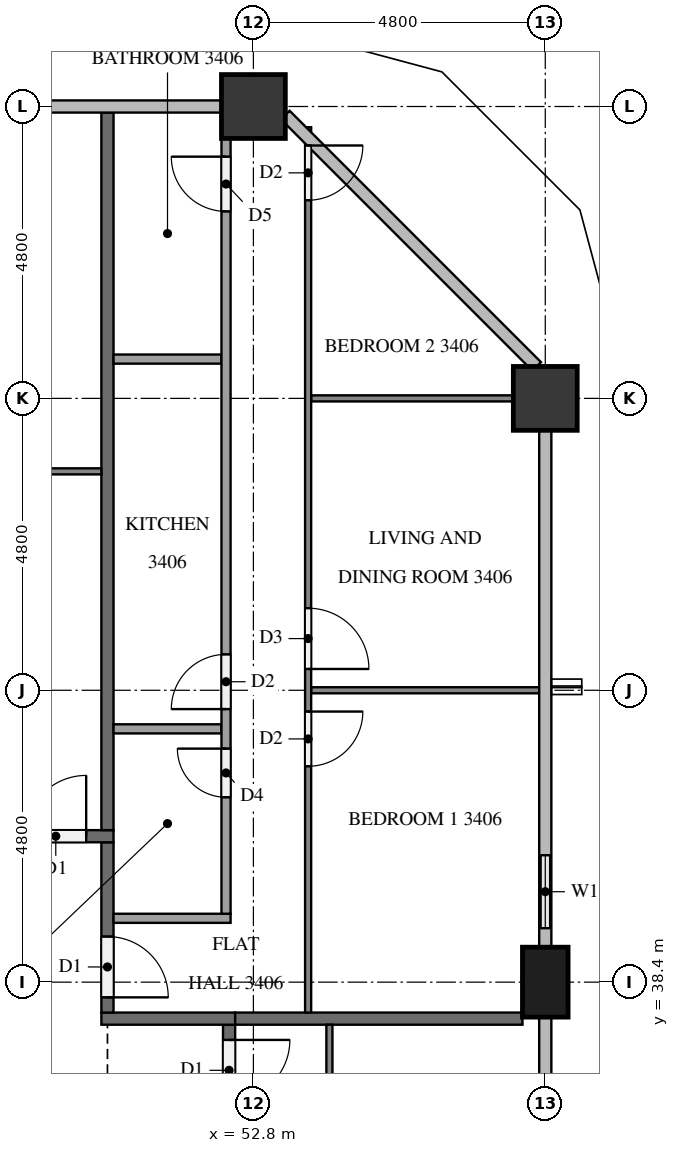
"""IFC4 building model, lengths in metres.
Left out: names, types, materials, properties, quantities, classifications, styles, units other than length and angle.
Written with IfcOpenShell. Run it as: python <this file> out.ifc"""

import sys

from ifc_helpers import new_model, si_unit, direction, frame, frame_2d, origin, origin_2d, place, context, subcontext, project, spatial, rectangle, extrude, element, fill, save


model = new_model("IFC4")
c1 = context("Model", 3, precision=1e-05, world=origin(), true_north=direction((0.0, 1.0)))
c2 = subcontext(c1, "Body", "Model", "MODEL_VIEW")
j1 = project(units=[si_unit("LENGTHUNIT", "METRE"), si_unit("PLANEANGLEUNIT", "RADIAN")], contexts=[c1])
p1 = place(None, origin())
s1 = spatial("IfcSite", under=j1, at=p1, CompositionType="ELEMENT")
p2 = place(p1, origin())
s2 = spatial("IfcBuilding", under=s1, at=p2, CompositionType="ELEMENT")
p3 = place(p2, frame((0.0, 0.0, 133.1)))
s3 = spatial("IfcBuildingStorey", under=s2, at=p3, CompositionType="ELEMENT", Elevation=133.1)
p4 = place(p3, frame((57.6, 38.4, 0.0), z_axis=(0.0, 0.0, 1.0), x_axis=(0.0, 1.0, 0.0)))
e1 = element("IfcColumn", 1, at=p4, inside=s3, PredefinedType="COLUMN", context=c2, shape_type="SweptSolid", body=[
    extrude(rectangle(XDim=1.15, YDim=0.75, at=origin_2d()), origin(), (0.0, 0.0, 1.0), 3.2),
])
for number, where, z_axis, x_axis in (
    (2, (57.6, 48.0, 0.0), (0.0, 0.0, 1.0), (1.0, 0.0, 0.0)),
    (3, (52.8, 52.8, 0.0), (0.0, 0.0, 1.0), (1.0, 0.0, 0.0)),
):
    element("IfcColumn", number, at=place(p3, frame(where, z_axis=z_axis, x_axis=x_axis)), inside=s3, PredefinedType="COLUMN", context=c2, shape_type="SweptSolid", body=[
        extrude(rectangle(XDim=1.05, YDim=1.05, at=origin_2d()), origin(), (0.0, 0.0, 1.0), 3.2),
    ])
p5 = place(p3, frame((57.6, 38.975, 0.0), z_axis=(0.0, 0.0, 1.0), x_axis=(0.0, 1.0, 0.0)))
e4 = element("IfcWall", 4, at=p5, inside=s3, PredefinedType="SOLIDWALL", context=c2, shape_type="SweptSolid", body=[
    extrude(rectangle(XDim=1.825, YDim=0.15, at=frame_2d((0.913, 0.0))), origin(), (0.0, 0.0, 1.0), 3.2),
])
p6 = place(p5, frame((0.312, 0.0, 0.9)))
e5 = element("IfcOpeningElement", 5, at=p6, cuts=e4, PredefinedType="OPENING", context=c2, shape_type="SweptSolid", body=[
    extrude(rectangle(XDim=1.2, YDim=1.4, at=frame_2d((0.6, 0.7))), frame((0.0, 0.085, 0.0), z_axis=(0.0, -1.0, 0.0), x_axis=(1.0, 0.0, 0.0)), (0.0, 0.0, 1.0), 0.17),
])
p7 = place(p3, frame((52.4, 37.7, 0.0), z_axis=(0.0, 0.0, 1.0), x_axis=(0.0, -1.0, 0.0)))
e6 = element("IfcWall", 6, at=p7, inside=s3, PredefinedType="PARTITIONING", context=c2, shape_type="SweptSolid", body=[
    extrude(rectangle(XDim=22.6, YDim=0.2, at=frame_2d((11.3, 0.0))), origin(), (0.0, 0.0, 1.0), 3.2),
])
p8 = place(p7, frame((0.25, 0.0, 0.0)))
e7 = element("IfcOpeningElement", 7, at=p8, cuts=e6, PredefinedType="OPENING", context=c2, shape_type="SweptSolid", body=[
    extrude(rectangle(XDim=1.0, YDim=2.1, at=frame_2d((0.5, 1.05))), frame((0.0, 0.11, 0.0), z_axis=(0.0, -1.0, 0.0), x_axis=(1.0, 0.0, 0.0)), (0.0, 0.0, 1.0), 0.22),
])
p9 = place(p3, frame((52.5, 37.8, 0.0), z_axis=(0.0, 0.0, 1.0), x_axis=(-1.0, 0.0, 0.0)))
e8 = element("IfcWall", 8, at=p9, inside=s3, PredefinedType="PARTITIONING", context=c2, shape_type="SweptSolid", body=[
    extrude(rectangle(XDim=2.2, YDim=0.2, at=frame_2d((1.1, 0.0))), origin(), (0.0, 0.0, 1.0), 3.2),
])
p10 = place(p3, frame((50.4, 40.7, 0.0), z_axis=(0.0, 0.0, 1.0), x_axis=(0.0, -1.0, 0.0)))
e9 = element("IfcWall", 9, at=p10, inside=s3, PredefinedType="PARTITIONING", context=c2, shape_type="SweptSolid", body=[
    extrude(rectangle(XDim=2.8, YDim=0.2, at=frame_2d((1.4, 0.0))), origin(), (0.0, 0.0, 1.0), 3.2),
])
p11 = place(p10, frame((1.55, 0.0, 0.0)))
e10 = element("IfcOpeningElement", 10, at=p11, cuts=e9, PredefinedType="OPENING", context=c2, shape_type="SweptSolid", body=[
    extrude(rectangle(XDim=1.0, YDim=2.1, at=frame_2d((0.5, 1.05))), frame((0.0, 0.11, 0.0), z_axis=(0.0, -1.0, 0.0), x_axis=(1.0, 0.0, 0.0)), (0.0, 0.0, 1.0), 0.22),
])
p12 = place(p3, frame((11.9, 40.8, 0.0), z_axis=(0.0, 0.0, 1.0), x_axis=(1.0, 0.0, 0.0)))
e11 = element("IfcWall", 11, at=p12, inside=s3, PredefinedType="PARTITIONING", context=c2, shape_type="SweptSolid", body=[
    extrude(rectangle(XDim=38.6, YDim=0.2, at=frame_2d((19.3, 0.0))), origin(), (0.0, 0.0, 1.0), 3.2),
])
p13 = place(p12, frame((37.15, 0.0, 0.0)))
e12 = element("IfcOpeningElement", 12, at=p13, cuts=e11, PredefinedType="OPENING", context=c2, shape_type="SweptSolid", body=[
    extrude(rectangle(XDim=1.0, YDim=2.1, at=frame_2d((0.5, 1.05))), frame((0.0, 0.11, 0.0), z_axis=(0.0, -1.0, 0.0), x_axis=(1.0, 0.0, 0.0)), (0.0, 0.0, 1.0), 0.22),
])
p14 = place(p12, frame((10.05, 0.0, 0.0)))
e13 = element("IfcOpeningElement", 13, at=p14, cuts=e11, PredefinedType="OPENING", context=c2, shape_type="SweptSolid", body=[
    extrude(rectangle(XDim=1.0, YDim=2.1, at=frame_2d((0.5, 1.05))), frame((0.0, 0.11, 0.0), z_axis=(0.0, -1.0, 0.0), x_axis=(1.0, 0.0, 0.0)), (0.0, 0.0, 1.0), 0.22),
])
p15 = place(p12, frame((0.45, 0.0, 0.0)))
e14 = element("IfcOpeningElement", 14, at=p15, cuts=e11, PredefinedType="OPENING", context=c2, shape_type="SweptSolid", body=[
    extrude(rectangle(XDim=1.0, YDim=2.1, at=frame_2d((0.5, 1.05))), frame((0.0, 0.11, 0.0), z_axis=(0.0, -1.0, 0.0), x_axis=(1.0, 0.0, 0.0)), (0.0, 0.0, 1.0), 0.22),
])
p16 = place(p3, frame((52.5, 37.8, 0.0), z_axis=(0.0, 0.0, 1.0), x_axis=(1.0, 0.0, 0.0)))
e15 = element("IfcWall", 15, at=p16, inside=s3, PredefinedType="PARTITIONING", context=c2, shape_type="SweptSolid", body=[
    extrude(rectangle(XDim=4.725, YDim=0.2, at=frame_2d((2.363, 0.0))), origin(), (0.0, 0.0, 1.0), 3.2),
])
p17 = place(p3, frame((50.4, 40.9, 0.0), z_axis=(0.0, 0.0, 1.0), x_axis=(0.0, 1.0, 0.0)))
e16 = element("IfcWall", 16, at=p17, inside=s3, PredefinedType="PARTITIONING", context=c2, shape_type="SweptSolid", body=[
    extrude(rectangle(XDim=11.8, YDim=0.2, at=frame_2d((5.9, 0.0))), origin(), (0.0, 0.0, 1.0), 3.2),
])
p18 = place(p3, frame((54.05, 37.7, 0.0), z_axis=(0.0, 0.0, 1.0), x_axis=(0.0, -1.0, 0.0)))
e17 = element("IfcWall", 17, at=p18, inside=s3, PredefinedType="PARTITIONING", context=c2, shape_type="SweptSolid", body=[
    extrude(rectangle(XDim=22.6, YDim=0.1, at=frame_2d((11.3, 0.0))), origin(), (0.0, 0.0, 1.0), 3.2),
])
p19 = place(p18, frame((2.85, 0.0, 0.0)))
e18 = element("IfcOpeningElement", 18, at=p19, cuts=e17, PredefinedType="OPENING", context=c2, shape_type="SweptSolid", body=[
    extrude(rectangle(XDim=0.9, YDim=2.1, at=frame_2d((0.45, 1.05))), frame((0.0, 0.06, 0.0), z_axis=(0.0, -1.0, 0.0), x_axis=(1.0, 0.0, 0.0)), (0.0, 0.0, 1.0), 0.12),
])
p20 = place(p18, frame((4.45, 0.0, 0.0)))
e19 = element("IfcOpeningElement", 19, at=p20, cuts=e17, PredefinedType="OPENING", context=c2, shape_type="SweptSolid", body=[
    extrude(rectangle(XDim=0.8, YDim=2.1, at=frame_2d((0.4, 1.05))), frame((0.0, 0.06, 0.0), z_axis=(0.0, -1.0, 0.0), x_axis=(1.0, 0.0, 0.0)), (0.0, 0.0, 1.0), 0.12),
])
p21 = place(p18, frame((10.05, 0.0, 0.0)))
e20 = element("IfcOpeningElement", 20, at=p21, cuts=e17, PredefinedType="OPENING", context=c2, shape_type="SweptSolid", body=[
    extrude(rectangle(XDim=0.9, YDim=2.1, at=frame_2d((0.45, 1.05))), frame((0.0, 0.06, 0.0), z_axis=(0.0, -1.0, 0.0), x_axis=(1.0, 0.0, 0.0)), (0.0, 0.0, 1.0), 0.12),
])
p22 = place(p18, frame((11.65, 0.0, 0.0)))
e21 = element("IfcOpeningElement", 21, at=p22, cuts=e17, PredefinedType="OPENING", context=c2, shape_type="SweptSolid", body=[
    extrude(rectangle(XDim=0.9, YDim=2.1, at=frame_2d((0.45, 1.05))), frame((0.0, 0.06, 0.0), z_axis=(0.0, -1.0, 0.0), x_axis=(1.0, 0.0, 0.0)), (0.0, 0.0, 1.0), 0.12),
])
p23 = place(p18, frame((19.55, 0.0, 0.0)))
e22 = element("IfcOpeningElement", 22, at=p23, cuts=e17, PredefinedType="OPENING", context=c2, shape_type="SweptSolid", body=[
    extrude(rectangle(XDim=1.0, YDim=2.1, at=frame_2d((0.5, 1.05))), frame((0.0, 0.06, 0.0), z_axis=(0.0, -1.0, 0.0), x_axis=(1.0, 0.0, 0.0)), (0.0, 0.0, 1.0), 0.12),
])
p24 = place(p18, frame((21.25, 0.0, 0.0)))
e23 = element("IfcOpeningElement", 23, at=p24, cuts=e17, PredefinedType="OPENING", context=c2, shape_type="SweptSolid", body=[
    extrude(rectangle(XDim=0.9, YDim=2.1, at=frame_2d((0.45, 1.05))), frame((0.0, 0.06, 0.0), z_axis=(0.0, -1.0, 0.0), x_axis=(1.0, 0.0, 0.0)), (0.0, 0.0, 1.0), 0.12),
])
p25 = place(p3, frame((53.75, 43.2, 0.0), z_axis=(0.0, 0.0, 1.0), x_axis=(1.0, 0.0, 0.0)))
e24 = element("IfcWall", 24, at=p25, inside=s3, PredefinedType="PARTITIONING", context=c2, shape_type="SweptSolid", body=[
    extrude(rectangle(XDim=3.75, YDim=0.1, at=frame_2d((1.875, 0.0))), origin(), (0.0, 0.0, 1.0), 3.2),
])
p26 = place(p3, frame((53.75, 48.0, 0.0), z_axis=(0.0, 0.0, 1.0), x_axis=(1.0, 0.0, 0.0)))
e25 = element("IfcWall", 25, at=p26, inside=s3, PredefinedType="PARTITIONING", context=c2, shape_type="SweptSolid", body=[
    extrude(rectangle(XDim=3.325, YDim=0.1, at=frame_2d((1.663, 0.0))), origin(), (0.0, 0.0, 1.0), 3.2),
])
p27 = place(p3, frame((53.7, 52.459, 0.0), z_axis=(0.0, 0.0, 1.0), x_axis=(0.0, -1.0, 0.0)))
e26 = element("IfcWall", 26, at=p27, inside=s3, PredefinedType="PARTITIONING", context=c2, shape_type="SweptSolid", body=[
    extrude(rectangle(XDim=14.559, YDim=0.1, at=frame_2d((7.279, 0.0))), origin(), (0.0, 0.0, 1.0), 3.2),
])
p28 = place(p27, frame((9.609, 0.0, 0.0)))
e27 = element("IfcOpeningElement", 27, at=p28, cuts=e26, PredefinedType="OPENING", context=c2, shape_type="SweptSolid", body=[
    extrude(rectangle(XDim=0.9, YDim=2.1, at=frame_2d((0.45, 1.05))), frame((0.0, 0.06, 0.0), z_axis=(0.0, -1.0, 0.0), x_axis=(1.0, 0.0, 0.0)), (0.0, 0.0, 1.0), 0.12),
])
p29 = place(p27, frame((7.909, 0.0, 0.0)))
e28 = element("IfcOpeningElement", 28, at=p29, cuts=e26, PredefinedType="OPENING", context=c2, shape_type="SweptSolid", body=[
    extrude(rectangle(XDim=1.0, YDim=2.1, at=frame_2d((0.5, 1.05))), frame((0.0, 0.06, 0.0), z_axis=(0.0, -1.0, 0.0), x_axis=(1.0, 0.0, 0.0)), (0.0, 0.0, 1.0), 0.12),
])
p30 = place(p27, frame((0.3, 0.0, 0.0)))
e29 = element("IfcOpeningElement", 29, at=p30, cuts=e26, PredefinedType="OPENING", context=c2, shape_type="SweptSolid", body=[
    extrude(rectangle(XDim=0.9, YDim=2.1, at=frame_2d((0.45, 1.05))), frame((0.0, 0.06, 0.0), z_axis=(0.0, -1.0, 0.0), x_axis=(1.0, 0.0, 0.0)), (0.0, 0.0, 1.0), 0.12),
])
for number, where, z_axis, x_axis in (
    (30, (50.5, 42.565, 0.0), (0.0, 0.0, 1.0), (1.0, 0.0, 0.0)),
    (31, (50.5, 48.646, 0.0), (0.0, 0.0, 1.0), (1.0, 0.0, 0.0)),
):
    element("IfcWall", number, at=place(p3, frame(where, z_axis=z_axis, x_axis=x_axis)), inside=s3, PredefinedType="PARTITIONING", context=c2, shape_type="SweptSolid", body=[
        extrude(rectangle(XDim=1.775, YDim=0.15, at=frame_2d((0.887, 0.0))), origin(), (0.0, 0.0, 1.0), 3.2),
    ])
p31 = place(p3, frame((50.5, 39.45, 0.0), z_axis=(0.0, 0.0, 1.0), x_axis=(1.0, 0.0, 0.0)))
e32 = element("IfcWall", 32, at=p31, inside=s3, PredefinedType="PARTITIONING", context=c2, shape_type="SweptSolid", body=[
    extrude(rectangle(XDim=1.925, YDim=0.15, at=frame_2d((0.962, 0.0))), origin(), (0.0, 0.0, 1.0), 3.2),
])
p32 = place(p3, frame((52.35, 39.525, 0.0), z_axis=(0.0, 0.0, 1.0), x_axis=(0.0, 1.0, 0.0)))
e33 = element("IfcWall", 33, at=p32, inside=s3, PredefinedType="PARTITIONING", context=c2, shape_type="SweptSolid", body=[
    extrude(rectangle(XDim=12.75, YDim=0.15, at=frame_2d((6.375, 0.0))), origin(), (0.0, 0.0, 1.0), 3.2),
])
p33 = place(p32, frame((1.915, 0.0, 0.0)))
e34 = element("IfcOpeningElement", 34, at=p33, cuts=e33, PredefinedType="OPENING", context=c2, shape_type="SweptSolid", body=[
    extrude(rectangle(XDim=0.8, YDim=2.1, at=frame_2d((0.4, 1.05))), frame((0.0, 0.085, 0.0), z_axis=(0.0, -1.0, 0.0), x_axis=(1.0, 0.0, 0.0)), (0.0, 0.0, 1.0), 0.17),
])
p34 = place(p32, frame((3.365, 0.0, 0.0)))
e35 = element("IfcOpeningElement", 35, at=p34, cuts=e33, PredefinedType="OPENING", context=c2, shape_type="SweptSolid", body=[
    extrude(rectangle(XDim=0.9, YDim=2.1, at=frame_2d((0.45, 1.05))), frame((0.0, 0.085, 0.0), z_axis=(0.0, -1.0, 0.0), x_axis=(1.0, 0.0, 0.0)), (0.0, 0.0, 1.0), 0.17),
])
p35 = place(p32, frame((11.55, 0.0, 0.0)))
e36 = element("IfcOpeningElement", 36, at=p35, cuts=e33, PredefinedType="OPENING", context=c2, shape_type="SweptSolid", body=[
    extrude(rectangle(XDim=0.9, YDim=2.1, at=frame_2d((0.45, 1.05))), frame((0.0, 0.085, 0.0), z_axis=(0.0, -1.0, 0.0), x_axis=(1.0, 0.0, 0.0)), (0.0, 0.0, 1.0), 0.17),
])
p36 = place(p3, frame((36.1, 46.8, 0.0), z_axis=(0.0, 0.0, 1.0), x_axis=(1.0, 0.0, 0.0)))
e37 = element("IfcWall", 37, at=p36, inside=s3, PredefinedType="PARTITIONING", context=c2, shape_type="SweptSolid", body=[
    extrude(rectangle(XDim=14.2, YDim=0.1, at=frame_2d((7.1, 0.0))), origin(), (0.0, 0.0, 1.0), 3.2),
])
p37 = place(p36, frame((9.85, 0.0, 0.0)))
e38 = element("IfcOpeningElement", 38, at=p37, cuts=e37, PredefinedType="OPENING", context=c2, shape_type="SweptSolid", body=[
    extrude(rectangle(XDim=0.9, YDim=2.1, at=frame_2d((0.45, 1.05))), frame((0.0, 0.06, 0.0), z_axis=(0.0, -1.0, 0.0), x_axis=(1.0, 0.0, 0.0)), (0.0, 0.0, 1.0), 0.12),
])
p38 = place(p36, frame((8.15, 0.0, 0.0)))
e39 = element("IfcOpeningElement", 39, at=p38, cuts=e37, PredefinedType="OPENING", context=c2, shape_type="SweptSolid", body=[
    extrude(rectangle(XDim=1.0, YDim=2.1, at=frame_2d((0.5, 1.05))), frame((0.0, 0.06, 0.0), z_axis=(0.0, -1.0, 0.0), x_axis=(1.0, 0.0, 0.0)), (0.0, 0.0, 1.0), 0.12),
])
p39 = place(p36, frame((0.3, 0.0, 0.0)))
e40 = element("IfcOpeningElement", 40, at=p39, cuts=e37, PredefinedType="OPENING", context=c2, shape_type="SweptSolid", body=[
    extrude(rectangle(XDim=0.9, YDim=2.1, at=frame_2d((0.45, 1.05))), frame((0.0, 0.06, 0.0), z_axis=(0.0, -1.0, 0.0), x_axis=(1.0, 0.0, 0.0)), (0.0, 0.0, 1.0), 0.12),
])
p40 = place(p6, origin())
e41 = element("IfcWindow", 41, at=p40, inside=s3, PartitioningType="SINGLE_PANEL", PredefinedType="WINDOW", context=c2, shape_type="SweptSolid", body=[
    extrude(rectangle(XDim=1.2, YDim=1.4, at=frame_2d((0.6, 0.7))), frame((0.0, 0.03, 0.0), z_axis=(0.0, -1.0, 0.0), x_axis=(1.0, 0.0, 0.0)), (0.0, 0.0, 1.0), 0.06),
])
fill(e5, e41)
p41 = place(p8, origin())
e42 = element("IfcDoor", 42, at=p41, inside=s3, OperationType="SINGLE_SWING_LEFT", PredefinedType="DOOR", context=c2, shape_type="SweptSolid", body=[
    extrude(rectangle(XDim=1.0, YDim=2.1, at=frame_2d((0.5, 1.05))), frame((0.0, 0.025, 0.0), z_axis=(0.0, -1.0, 0.0), x_axis=(1.0, 0.0, 0.0)), (0.0, 0.0, 1.0), 0.05),
])
fill(e7, e42)
p42 = place(p11, origin())
e43 = element("IfcDoor", 43, at=p42, inside=s3, OperationType="SINGLE_SWING_RIGHT", PredefinedType="DOOR", context=c2, shape_type="SweptSolid", body=[
    extrude(rectangle(XDim=1.0, YDim=2.1, at=frame_2d((0.5, 1.05))), frame((0.0, 0.025, 0.0), z_axis=(0.0, -1.0, 0.0), x_axis=(1.0, 0.0, 0.0)), (0.0, 0.0, 1.0), 0.05),
])
fill(e10, e43)
p43 = place(p13, origin())
e44 = element("IfcDoor", 44, at=p43, inside=s3, OperationType="SINGLE_SWING_RIGHT", PredefinedType="DOOR", context=c2, shape_type="SweptSolid", body=[
    extrude(rectangle(XDim=1.0, YDim=2.1, at=frame_2d((0.5, 1.05))), frame((0.0, 0.025, 0.0), z_axis=(0.0, -1.0, 0.0), x_axis=(1.0, 0.0, 0.0)), (0.0, 0.0, 1.0), 0.05),
])
fill(e12, e44)
p44 = place(p28, origin())
e45 = element("IfcDoor", 45, at=p44, inside=s3, OperationType="SINGLE_SWING_LEFT", PredefinedType="DOOR", context=c2, shape_type="SweptSolid", body=[
    extrude(rectangle(XDim=0.9, YDim=2.1, at=frame_2d((0.45, 1.05))), frame((0.0, 0.025, 0.0), z_axis=(0.0, -1.0, 0.0), x_axis=(1.0, 0.0, 0.0)), (0.0, 0.0, 1.0), 0.05),
])
fill(e27, e45)
p45 = place(p29, origin())
e46 = element("IfcDoor", 46, at=p45, inside=s3, OperationType="SINGLE_SWING_RIGHT", PredefinedType="DOOR", context=c2, shape_type="SweptSolid", body=[
    extrude(rectangle(XDim=1.0, YDim=2.1, at=frame_2d((0.5, 1.05))), frame((0.0, 0.025, 0.0), z_axis=(0.0, -1.0, 0.0), x_axis=(1.0, 0.0, 0.0)), (0.0, 0.0, 1.0), 0.05),
])
fill(e28, e46)
p46 = place(p30, origin())
e47 = element("IfcDoor", 47, at=p46, inside=s3, OperationType="SINGLE_SWING_LEFT", PredefinedType="DOOR", context=c2, shape_type="SweptSolid", body=[
    extrude(rectangle(XDim=0.9, YDim=2.1, at=frame_2d((0.45, 1.05))), frame((0.0, 0.025, 0.0), z_axis=(0.0, -1.0, 0.0), x_axis=(1.0, 0.0, 0.0)), (0.0, 0.0, 1.0), 0.05),
])
fill(e29, e47)
p47 = place(p33, origin())
e48 = element("IfcDoor", 48, at=p47, inside=s3, OperationType="SINGLE_SWING_RIGHT", PredefinedType="DOOR", context=c2, shape_type="SweptSolid", body=[
    extrude(rectangle(XDim=0.8, YDim=2.1, at=frame_2d((0.4, 1.05))), frame((0.0, 0.025, 0.0), z_axis=(0.0, -1.0, 0.0), x_axis=(1.0, 0.0, 0.0)), (0.0, 0.0, 1.0), 0.05),
])
fill(e34, e48)
p48 = place(p34, origin())
e49 = element("IfcDoor", 49, at=p48, inside=s3, OperationType="SINGLE_SWING_LEFT", PredefinedType="DOOR", context=c2, shape_type="SweptSolid", body=[
    extrude(rectangle(XDim=0.9, YDim=2.1, at=frame_2d((0.45, 1.05))), frame((0.0, 0.025, 0.0), z_axis=(0.0, -1.0, 0.0), x_axis=(1.0, 0.0, 0.0)), (0.0, 0.0, 1.0), 0.05),
])
fill(e35, e49)
p49 = place(p35, origin())
e50 = element("IfcDoor", 50, at=p49, inside=s3, OperationType="SINGLE_SWING_RIGHT", PredefinedType="DOOR", context=c2, shape_type="SweptSolid", body=[
    extrude(rectangle(XDim=0.9, YDim=2.1, at=frame_2d((0.45, 1.05))), frame((0.0, 0.025, 0.0), z_axis=(0.0, -1.0, 0.0), x_axis=(1.0, 0.0, 0.0)), (0.0, 0.0, 1.0), 0.05),
])
fill(e36, e50)
save(model, sys.argv[1])
